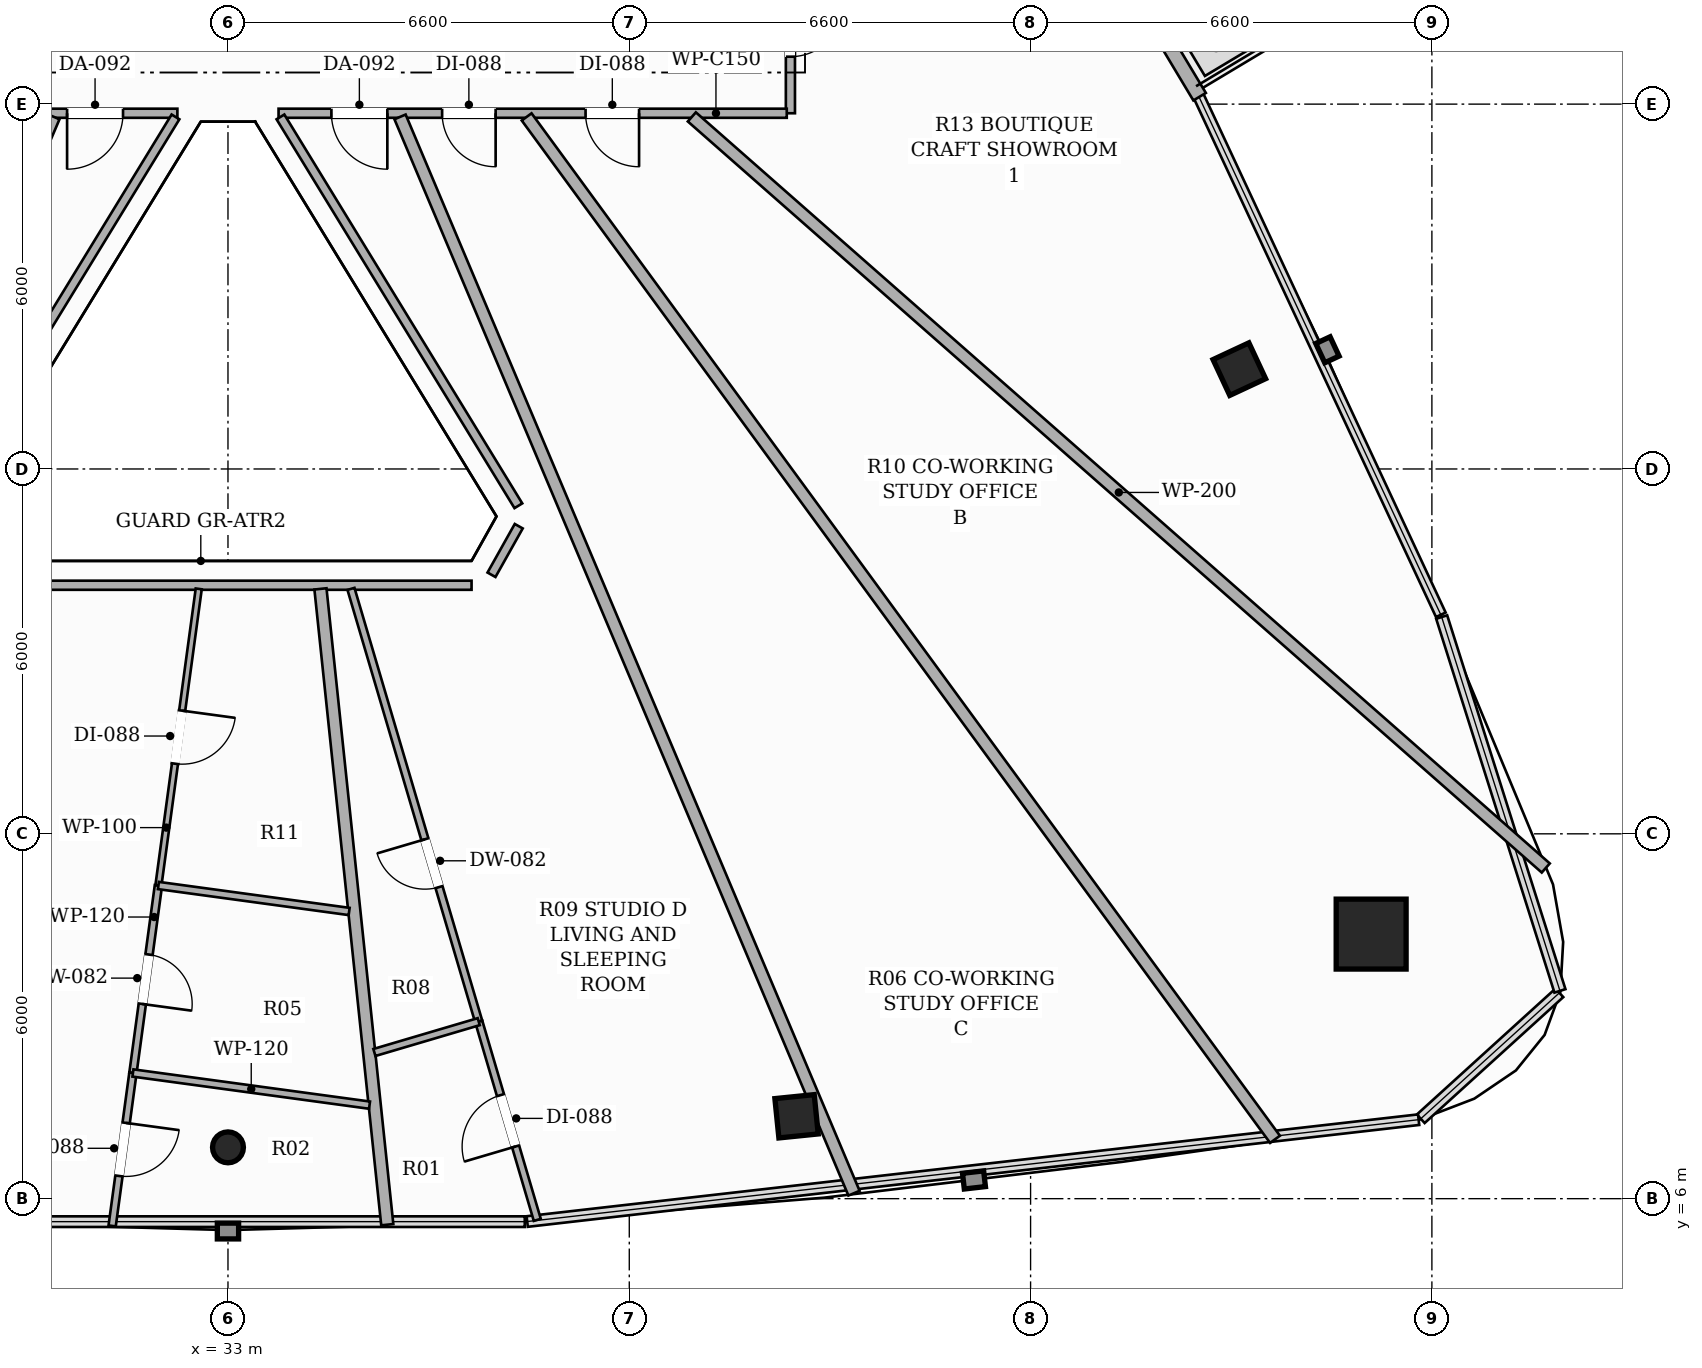
"""IFC4 building model, lengths in metres.
Left out: names, types, materials, properties, quantities, classifications, styles, units other than length and angle.
Written with IfcOpenShell. Run it as: python <this file> out.ifc"""

import sys

from ifc_helpers import new_model, si_unit, direction, frame, frame_2d, origin, origin_2d, place, context, subcontext, project, spatial, rectangle, hollow_rectangle, hollow_circle, extrude, element, fill, save


model = new_model("IFC4")
c1 = context("Model", 3, precision=1e-05, world=origin(), true_north=direction((0.0, 1.0)))
c2 = subcontext(c1, "Body", "Model", "MODEL_VIEW")
j1 = project(units=[si_unit("LENGTHUNIT", "METRE"), si_unit("PLANEANGLEUNIT", "RADIAN")], contexts=[c1])
p1 = place(None, origin())
s1 = spatial("IfcSite", under=j1, at=p1, CompositionType="ELEMENT")
p2 = place(p1, origin())
s2 = spatial("IfcBuilding", under=s1, at=p2, CompositionType="ELEMENT")
p3 = place(p2, frame((0.0, 0.0, 266.75)))
s3 = spatial("IfcBuildingStorey", under=s2, at=p3, CompositionType="ELEMENT", Elevation=266.75)
p4 = place(p3, frame((51.801, 10.351, 0.0), z_axis=(0.0, 0.0, 1.0), x_axis=(1.0, 0.0, 0.0)))
e1 = element("IfcColumn", 1, at=p4, inside=s3, PredefinedType="COLUMN", context=c2, shape_type="SweptSolid", body=[
    extrude(hollow_rectangle(XDim=1.15, YDim=1.15, WallThickness=0.036, at=origin_2d()), origin(), (0.0, 0.0, 1.0), 3.3),
])
p5 = place(p3, frame((33.0, 6.844, 0.0), z_axis=(0.0, 0.0, 1.0), x_axis=(1.0, 0.0, 0.0)))
e2 = element("IfcColumn", 2, at=p5, inside=s3, PredefinedType="COLUMN", context=c2, shape_type="SweptSolid", body=[
    extrude(hollow_circle(Radius=0.254, WallThickness=0.016, at=origin_2d()), origin(), (0.0, 0.0, 1.0), 3.3),
])
for number, where, z_axis, x_axis in (
    (3, (42.351, 7.355, 0.0), (0.0, 0.0, 1.0), (0.995, 0.101, 0.0)),
    (4, (49.633, 19.642, 0.0), (0.0, 0.0, 1.0), (-0.423, 0.906, 0.0)),
):
    element("IfcColumn", number, at=place(p3, frame(where, z_axis=z_axis, x_axis=x_axis)), inside=s3, PredefinedType="COLUMN", context=c2, shape_type="SweptSolid", body=[
        extrude(hollow_rectangle(XDim=0.65, YDim=0.65, WallThickness=0.022, at=origin_2d()), origin(), (0.0, 0.0, 1.0), 3.3),
    ])
p6 = place(p3, frame((48.98, 24.122, 0.0), z_axis=(0.0, 0.0, 1.0), x_axis=(-0.514361929684, 0.857573206958, 0.0)))
e5 = element("IfcWall", 5, at=p6, inside=s3, PredefinedType="SOLIDWALL", context=c2, shape_type="SweptSolid", body=[
    extrude(rectangle(XDim=9.659, YDim=0.24, at=frame_2d((4.829, 0.0))), origin(), (0.0, 0.0, 1.0), 2.624),
])
p7 = place(p6, frame((7.162, 0.0, 0.0)))
e6 = element("IfcOpeningElement", 6, at=p7, cuts=e5, PredefinedType="OPENING", context=c2, shape_type="SweptSolid", body=[
    extrude(rectangle(XDim=1.8, YDim=2.2, at=frame_2d((0.9, 1.1))), frame((0.0, 0.13, 0.0), z_axis=(0.0, -1.0, 0.0), x_axis=(1.0, 0.0, 0.0)), (0.0, 0.0, 1.0), 0.26),
])
p8 = place(p3, frame((32.168, 23.85, 0.0), z_axis=(0.0, 0.0, 1.0), x_axis=(-1.0, 0.0, 0.0)))
e7 = element("IfcWall", 7, at=p8, inside=s3, PredefinedType="PARTITIONING", context=c2, shape_type="SweptSolid", body=[
    extrude(rectangle(XDim=8.518, YDim=0.15, at=frame_2d((4.259, 0.0))), origin(), (0.0, 0.0, 1.0), 2.565),
])
p9 = place(p8, frame((0.894, 0.0, 0.0)))
e8 = element("IfcOpeningElement", 8, at=p9, cuts=e7, PredefinedType="OPENING", context=c2, shape_type="SweptSolid", body=[
    extrude(rectangle(XDim=0.92, YDim=2.15, at=frame_2d((0.46, 1.075))), frame((0.0, 0.085, 0.0), z_axis=(0.0, -1.0, 0.0), x_axis=(1.0, 0.0, 0.0)), (0.0, 0.0, 1.0), 0.17),
])
p10 = place(p8, frame((2.683, 0.0, 0.0)))
e9 = element("IfcOpeningElement", 9, at=p10, cuts=e7, PredefinedType="OPENING", context=c2, shape_type="SweptSolid", body=[
    extrude(rectangle(XDim=0.88, YDim=2.1, at=frame_2d((0.44, 1.05))), frame((0.0, 0.085, 0.0), z_axis=(0.0, -1.0, 0.0), x_axis=(1.0, 0.0, 0.0)), (0.0, 0.0, 1.0), 0.17),
])
p11 = place(p8, frame((4.638, 0.0, 0.0)))
e10 = element("IfcOpeningElement", 10, at=p11, cuts=e7, PredefinedType="OPENING", context=c2, shape_type="SweptSolid", body=[
    extrude(rectangle(XDim=0.82, YDim=2.1, at=frame_2d((0.41, 1.05))), frame((0.0, 0.085, 0.0), z_axis=(0.0, -1.0, 0.0), x_axis=(1.0, 0.0, 0.0)), (0.0, 0.0, 1.0), 0.17),
])
p12 = place(p3, frame((42.25, 26.59, 0.0), z_axis=(0.0, 0.0, 1.0), x_axis=(0.0, -1.0, 0.0)))
e11 = element("IfcWall", 11, at=p12, inside=s3, PredefinedType="PARTITIONING", context=c2, shape_type="SweptSolid", body=[
    extrude(rectangle(XDim=2.74, YDim=0.15, at=frame_2d((1.37, 0.0))), origin(), (0.0, 0.0, 1.0), 2.773),
])
p13 = place(p12, frame((0.93, 0.0, 0.0)))
e12 = element("IfcOpeningElement", 12, at=p13, cuts=e11, PredefinedType="OPENING", context=c2, shape_type="SweptSolid", body=[
    extrude(rectangle(XDim=0.88, YDim=2.1, at=frame_2d((0.44, 1.05))), frame((0.0, 0.085, 0.0), z_axis=(0.0, -1.0, 0.0), x_axis=(1.0, 0.0, 0.0)), (0.0, 0.0, 1.0), 0.17),
])
p14 = place(p3, frame((42.19, 23.85, 0.0), z_axis=(0.0, 0.0, 1.0), x_axis=(-1.0, 0.0, 0.0)))
e13 = element("IfcWall", 13, at=p14, inside=s3, PredefinedType="PARTITIONING", context=c2, shape_type="SweptSolid", body=[
    extrude(rectangle(XDim=8.358, YDim=0.15, at=frame_2d((4.179, 0.0))), origin(), (0.0, 0.0, 1.0), 2.565),
])
p15 = place(p14, frame((2.429, 0.0, 0.0)))
e14 = element("IfcOpeningElement", 14, at=p15, cuts=e13, PredefinedType="OPENING", context=c2, shape_type="SweptSolid", body=[
    extrude(rectangle(XDim=0.88, YDim=2.1, at=frame_2d((0.44, 1.05))), frame((0.0, 0.085, 0.0), z_axis=(0.0, -1.0, 0.0), x_axis=(1.0, 0.0, 0.0)), (0.0, 0.0, 1.0), 0.17),
])
p16 = place(p14, frame((4.788, 0.0, 0.0)))
e15 = element("IfcOpeningElement", 15, at=p16, cuts=e13, PredefinedType="OPENING", context=c2, shape_type="SweptSolid", body=[
    extrude(rectangle(XDim=0.88, YDim=2.1, at=frame_2d((0.44, 1.05))), frame((0.0, 0.085, 0.0), z_axis=(0.0, -1.0, 0.0), x_axis=(1.0, 0.0, 0.0)), (0.0, 0.0, 1.0), 0.17),
])
p17 = place(p14, frame((6.569, 0.0, 0.0)))
e16 = element("IfcOpeningElement", 16, at=p17, cuts=e13, PredefinedType="OPENING", context=c2, shape_type="SweptSolid", body=[
    extrude(rectangle(XDim=0.92, YDim=2.15, at=frame_2d((0.46, 1.075))), frame((0.0, 0.085, 0.0), z_axis=(0.0, -1.0, 0.0), x_axis=(1.0, 0.0, 0.0)), (0.0, 0.0, 1.0), 0.17),
])
p18 = place(p3, frame((33.863, 23.79, 0.0), z_axis=(0.0, 0.0, 1.0), x_axis=(0.521913594497, -0.852998358661, 0.0)))
e17 = element("IfcWall", 17, at=p18, inside=s3, PredefinedType="PARTITIONING", context=c2, shape_type="SweptSolid", body=[
    extrude(rectangle(XDim=7.497, YDim=0.15, at=frame_2d((3.749, 0.0))), origin(), (0.0, 0.0, 1.0), 2.773),
])
p19 = place(p3, frame((37.782, 17.059, 0.0), z_axis=(0.0, 0.0, 1.0), x_axis=(-0.489033415255, -0.872265050752, 0.0)))
e18 = element("IfcWall", 18, at=p19, inside=s3, PredefinedType="PARTITIONING", context=c2, shape_type="SweptSolid", body=[
    extrude(rectangle(XDim=0.916, YDim=0.15, at=frame_2d((0.458, 0.0))), origin(), (0.0, 0.0, 1.0), 3.06),
])
p20 = place(p3, frame((37.006, 16.088, 0.0), z_axis=(0.0, 0.0, 1.0), x_axis=(-1.0, 0.0, 0.0)))
e19 = element("IfcWall", 19, at=p20, inside=s3, PredefinedType="PARTITIONING", context=c2, shape_type="SweptSolid", body=[
    extrude(rectangle(XDim=8.012, YDim=0.15, at=frame_2d((4.006, 0.0))), origin(), (0.0, 0.0, 1.0), 2.773),
])
p21 = place(p3, frame((28.224, 17.395, 0.0), z_axis=(0.0, 0.0, 1.0), x_axis=(0.521913594497, 0.852998358661, 0.0)))
e20 = element("IfcWall", 20, at=p21, inside=s3, PredefinedType="PARTITIONING", context=c2, shape_type="SweptSolid", body=[
    extrude(rectangle(XDim=7.497, YDim=0.15, at=frame_2d((3.749, 0.0))), origin(), (0.0, 0.0, 1.0), 2.773),
])
p22 = place(p3, frame((54.673, 11.438, 0.0), z_axis=(0.0, 0.0, 1.0), x_axis=(-0.750894752688, 0.660421888179, 0.0)))
e21 = element("IfcWall", 21, at=p22, inside=s3, PredefinedType="PARTITIONING", context=c2, shape_type="SweptSolid", body=[
    extrude(rectangle(XDim=18.703, YDim=0.2, at=frame_2d((9.352, 0.0))), origin(), (0.0, 0.0, 1.0), 2.492),
])
p23 = place(p3, frame((34.521, 16.028, 0.0), z_axis=(0.0, 0.0, 1.0), x_axis=(0.104542147599, -0.994520456992, 0.0)))
e22 = element("IfcWall", 22, at=p23, inside=s3, PredefinedType="PARTITIONING", context=c2, shape_type="SweptSolid", body=[
    extrude(rectangle(XDim=10.514, YDim=0.2, at=frame_2d((5.257, 0.0))), origin(), (0.0, 0.0, 1.0), 2.492),
])
p24 = place(p3, frame((22.589, 6.104, 0.0), z_axis=(0.0, 0.0, 1.0), x_axis=(0.392518309842, 0.919744190761, 0.0)))
e23 = element("IfcWall", 23, at=p24, inside=s3, PredefinedType="PARTITIONING", context=c2, shape_type="SweptSolid", body=[
    extrude(rectangle(XDim=19.229, YDim=0.2, at=frame_2d((9.615, 0.0))), origin(), (0.0, 0.0, 1.0), 2.492),
])
p25 = place(p3, frame((50.22, 6.976, 0.0), z_axis=(0.0, 0.0, 1.0), x_axis=(-0.59066502199, 0.80691686796, 0.0)))
e24 = element("IfcWall", 24, at=p25, inside=s3, PredefinedType="PARTITIONING", context=c2, shape_type="SweptSolid", body=[
    extrude(rectangle(XDim=20.837, YDim=0.2, at=frame_2d((10.419, 0.0))), origin(), (0.0, 0.0, 1.0), 2.492),
])
p26 = place(p3, frame((43.296, 6.09, 0.0), z_axis=(0.0, 0.0, 1.0), x_axis=(-0.388640997534, 0.921389263578, 0.0)))
e25 = element("IfcWall", 25, at=p26, inside=s3, PredefinedType="PARTITIONING", context=c2, shape_type="SweptSolid", body=[
    extrude(rectangle(XDim=19.21, YDim=0.2, at=frame_2d((9.605, 0.0))), origin(), (0.0, 0.0, 1.0), 2.492),
])
p27 = place(p3, frame((31.856, 11.15, 0.0), z_axis=(0.0, 0.0, 1.0), x_axis=(-0.134650977284, -0.990893089246, 0.0)))
e26 = element("IfcWall", 26, at=p27, inside=s3, PredefinedType="PARTITIONING", context=c2, shape_type="SweptSolid", body=[
    extrude(rectangle(XDim=3.111, YDim=0.12, at=frame_2d((1.556, 0.0))), origin(), (0.0, 0.0, 1.0), 3.06),
])
p28 = place(p27, frame((1.146, 0.0, 0.0)))
e27 = element("IfcOpeningElement", 27, at=p28, cuts=e26, PredefinedType="OPENING", context=c2, shape_type="SweptSolid", body=[
    extrude(rectangle(XDim=0.82, YDim=2.1, at=frame_2d((0.41, 1.05))), frame((0.0, 0.07, 0.0), z_axis=(0.0, -1.0, 0.0), x_axis=(1.0, 0.0, 0.0)), (0.0, 0.0, 1.0), 0.14),
])
p29 = place(p3, frame((31.437, 8.067, 0.0), z_axis=(0.0, 0.0, 1.0), x_axis=(-0.134765499074, -0.990877520312, 0.0)))
e28 = element("IfcWall", 28, at=p29, inside=s3, PredefinedType="PARTITIONING", context=c2, shape_type="SweptSolid", body=[
    extrude(rectangle(XDim=2.538, YDim=0.12, at=frame_2d((1.269, 0.0))), origin(), (0.0, 0.0, 1.0), 2.492),
])
p30 = place(p29, frame((0.829, 0.0, 0.0)))
e29 = element("IfcOpeningElement", 29, at=p30, cuts=e28, PredefinedType="OPENING", context=c2, shape_type="SweptSolid", body=[
    extrude(rectangle(XDim=0.88, YDim=2.1, at=frame_2d((0.44, 1.05))), frame((0.0, 0.07, 0.0), z_axis=(0.0, -1.0, 0.0), x_axis=(1.0, 0.0, 0.0)), (0.0, 0.0, 1.0), 0.14),
])
p31 = place(p3, frame((32.519, 16.028, 0.0), z_axis=(0.0, 0.0, 1.0), x_axis=(-0.134690507908, -0.990887716686, 0.0)))
e30 = element("IfcWall", 30, at=p31, inside=s3, PredefinedType="PARTITIONING", context=c2, shape_type="SweptSolid", body=[
    extrude(rectangle(XDim=4.923, YDim=0.1, at=frame_2d((2.461, 0.0))), origin(), (0.0, 0.0, 1.0), 3.06),
])
p32 = place(p31, frame((2.021, 0.0, 0.0)))
e31 = element("IfcOpeningElement", 31, at=p32, cuts=e30, PredefinedType="OPENING", context=c2, shape_type="SweptSolid", body=[
    extrude(rectangle(XDim=0.88, YDim=2.1, at=frame_2d((0.44, 1.05))), frame((0.0, 0.06, 0.0), z_axis=(0.0, -1.0, 0.0), x_axis=(1.0, 0.0, 0.0)), (0.0, 0.0, 1.0), 0.12),
])
p33 = place(p3, frame((35.328, 7.538, 0.0), z_axis=(0.0, 0.0, 1.0), x_axis=(-0.990890227425, 0.134672035678, 0.0)))
e32 = element("IfcWall", 32, at=p33, inside=s3, PredefinedType="PARTITIONING", context=c2, shape_type="SweptSolid", body=[
    extrude(rectangle(XDim=3.927, YDim=0.12, at=frame_2d((1.963, 0.0))), origin(), (0.0, 0.0, 1.0), 2.773),
])
p34 = place(p3, frame((31.856, 11.15, 0.0), z_axis=(0.0, 0.0, 1.0), x_axis=(0.990862518896, -0.13487575263, 0.0)))
e33 = element("IfcWall", 33, at=p34, inside=s3, PredefinedType="PARTITIONING", context=c2, shape_type="SweptSolid", body=[
    extrude(rectangle(XDim=3.166, YDim=0.12, at=frame_2d((1.583, 0.0))), origin(), (0.0, 0.0, 1.0), 2.773),
])
p35 = place(p3, frame((37.124, 8.911, 0.0), z_axis=(0.0, 0.0, 1.0), x_axis=(-0.283131577199, 0.959081075818, 0.0)))
e34 = element("IfcWall", 34, at=p35, inside=s3, PredefinedType="PARTITIONING", context=c2, shape_type="SweptSolid", body=[
    extrude(rectangle(XDim=7.421, YDim=0.12, at=frame_2d((3.71, 0.0))), origin(), (0.0, 0.0, 1.0), 2.773),
])
p36 = place(p35, frame((2.307, 0.0, 0.0)))
e35 = element("IfcOpeningElement", 35, at=p36, cuts=e34, PredefinedType="OPENING", context=c2, shape_type="SweptSolid", body=[
    extrude(rectangle(XDim=0.82, YDim=2.1, at=frame_2d((0.41, 1.05))), frame((0.0, 0.07, 0.0), z_axis=(0.0, -1.0, 0.0), x_axis=(1.0, 0.0, 0.0)), (0.0, 0.0, 1.0), 0.14),
])
p37 = place(p3, frame((38.087, 5.651, 0.0), z_axis=(0.0, 0.0, 1.0), x_axis=(-0.28300230386, 0.959119229299, 0.0)))
e36 = element("IfcWall", 36, at=p37, inside=s3, PredefinedType="PARTITIONING", context=c2, shape_type="SweptSolid", body=[
    extrude(rectangle(XDim=3.399, YDim=0.12, at=frame_2d((1.699, 0.0))), origin(), (0.0, 0.0, 1.0), 2.492),
])
p38 = place(p37, frame((1.259, 0.0, 0.0)))
e37 = element("IfcOpeningElement", 37, at=p38, cuts=e36, PredefinedType="OPENING", context=c2, shape_type="SweptSolid", body=[
    extrude(rectangle(XDim=0.88, YDim=2.1, at=frame_2d((0.44, 1.05))), frame((0.0, 0.07, 0.0), z_axis=(0.0, -1.0, 0.0), x_axis=(1.0, 0.0, 0.0)), (0.0, 0.0, 1.0), 0.14),
])
p39 = place(p3, frame((37.124, 8.911, 0.0), z_axis=(0.0, 0.0, 1.0), x_axis=(-0.959045510231, -0.283252024362, 0.0)))
e38 = element("IfcWall", 38, at=p39, inside=s3, PredefinedType="PARTITIONING", context=c2, shape_type="SweptSolid", body=[
    extrude(rectangle(XDim=1.789, YDim=0.12, at=frame_2d((0.895, 0.0))), origin(), (0.0, 0.0, 1.0), 3.06),
])
p40 = place(p13, origin())
e39 = element("IfcDoor", 39, at=p40, inside=s3, OperationType="SINGLE_SWING_LEFT", PredefinedType="DOOR", context=c2, shape_type="SweptSolid", body=[
    extrude(rectangle(XDim=0.88, YDim=2.1, at=frame_2d((0.44, 1.05))), frame((0.0, 0.025, 0.0), z_axis=(0.0, -1.0, 0.0), x_axis=(1.0, 0.0, 0.0)), (0.0, 0.0, 1.0), 0.05),
])
fill(e12, e39)
p41 = place(p9, origin())
e40 = element("IfcDoor", 40, at=p41, inside=s3, OperationType="SINGLE_SWING_RIGHT", PredefinedType="DOOR", context=c2, shape_type="SweptSolid", body=[
    extrude(rectangle(XDim=0.92, YDim=2.15, at=frame_2d((0.46, 1.075))), frame((0.0, 0.025, 0.0), z_axis=(0.0, -1.0, 0.0), x_axis=(1.0, 0.0, 0.0)), (0.0, 0.0, 1.0), 0.05),
])
fill(e8, e40)
p42 = place(p28, origin())
e41 = element("IfcDoor", 41, at=p42, inside=s3, OperationType="SINGLE_SWING_RIGHT", PredefinedType="DOOR", context=c2, shape_type="SweptSolid", body=[
    extrude(rectangle(XDim=0.82, YDim=2.1, at=frame_2d((0.41, 1.05))), frame((0.0, 0.025, 0.0), z_axis=(0.0, -1.0, 0.0), x_axis=(1.0, 0.0, 0.0)), (0.0, 0.0, 1.0), 0.05),
])
fill(e27, e41)
p43 = place(p30, origin())
e42 = element("IfcDoor", 42, at=p43, inside=s3, OperationType="SINGLE_SWING_LEFT", PredefinedType="DOOR", context=c2, shape_type="SweptSolid", body=[
    extrude(rectangle(XDim=0.88, YDim=2.1, at=frame_2d((0.44, 1.05))), frame((0.0, 0.025, 0.0), z_axis=(0.0, -1.0, 0.0), x_axis=(1.0, 0.0, 0.0)), (0.0, 0.0, 1.0), 0.05),
])
fill(e29, e42)
p44 = place(p32, origin())
e43 = element("IfcDoor", 43, at=p44, inside=s3, OperationType="SINGLE_SWING_LEFT", PredefinedType="DOOR", context=c2, shape_type="SweptSolid", body=[
    extrude(rectangle(XDim=0.88, YDim=2.1, at=frame_2d((0.44, 1.05))), frame((0.0, 0.025, 0.0), z_axis=(0.0, -1.0, 0.0), x_axis=(1.0, 0.0, 0.0)), (0.0, 0.0, 1.0), 0.05),
])
fill(e31, e43)
p45 = place(p15, origin())
e44 = element("IfcDoor", 44, at=p45, inside=s3, OperationType="SINGLE_SWING_LEFT", PredefinedType="DOOR", context=c2, shape_type="SweptSolid", body=[
    extrude(rectangle(XDim=0.88, YDim=2.1, at=frame_2d((0.44, 1.05))), frame((0.0, 0.025, 0.0), z_axis=(0.0, -1.0, 0.0), x_axis=(1.0, 0.0, 0.0)), (0.0, 0.0, 1.0), 0.05),
])
fill(e14, e44)
p46 = place(p16, origin())
e45 = element("IfcDoor", 45, at=p46, inside=s3, OperationType="SINGLE_SWING_LEFT", PredefinedType="DOOR", context=c2, shape_type="SweptSolid", body=[
    extrude(rectangle(XDim=0.88, YDim=2.1, at=frame_2d((0.44, 1.05))), frame((0.0, 0.025, 0.0), z_axis=(0.0, -1.0, 0.0), x_axis=(1.0, 0.0, 0.0)), (0.0, 0.0, 1.0), 0.05),
])
fill(e15, e45)
p47 = place(p17, origin())
e46 = element("IfcDoor", 46, at=p47, inside=s3, OperationType="SINGLE_SWING_LEFT", PredefinedType="DOOR", context=c2, shape_type="SweptSolid", body=[
    extrude(rectangle(XDim=0.92, YDim=2.15, at=frame_2d((0.46, 1.075))), frame((0.0, 0.025, 0.0), z_axis=(0.0, -1.0, 0.0), x_axis=(1.0, 0.0, 0.0)), (0.0, 0.0, 1.0), 0.05),
])
fill(e16, e46)
p48 = place(p36, origin())
e47 = element("IfcDoor", 47, at=p48, inside=s3, OperationType="SINGLE_SWING_RIGHT", PredefinedType="DOOR", context=c2, shape_type="SweptSolid", body=[
    extrude(rectangle(XDim=0.82, YDim=2.1, at=frame_2d((0.41, 1.05))), frame((0.0, 0.025, 0.0), z_axis=(0.0, -1.0, 0.0), x_axis=(1.0, 0.0, 0.0)), (0.0, 0.0, 1.0), 0.05),
])
fill(e35, e47)
p49 = place(p38, origin())
e48 = element("IfcDoor", 48, at=p49, inside=s3, OperationType="SINGLE_SWING_LEFT", PredefinedType="DOOR", context=c2, shape_type="SweptSolid", body=[
    extrude(rectangle(XDim=0.88, YDim=2.1, at=frame_2d((0.44, 1.05))), frame((0.0, 0.025, 0.0), z_axis=(0.0, -1.0, 0.0), x_axis=(1.0, 0.0, 0.0)), (0.0, 0.0, 1.0), 0.05),
])
fill(e37, e48)
save(model, sys.argv[1])
